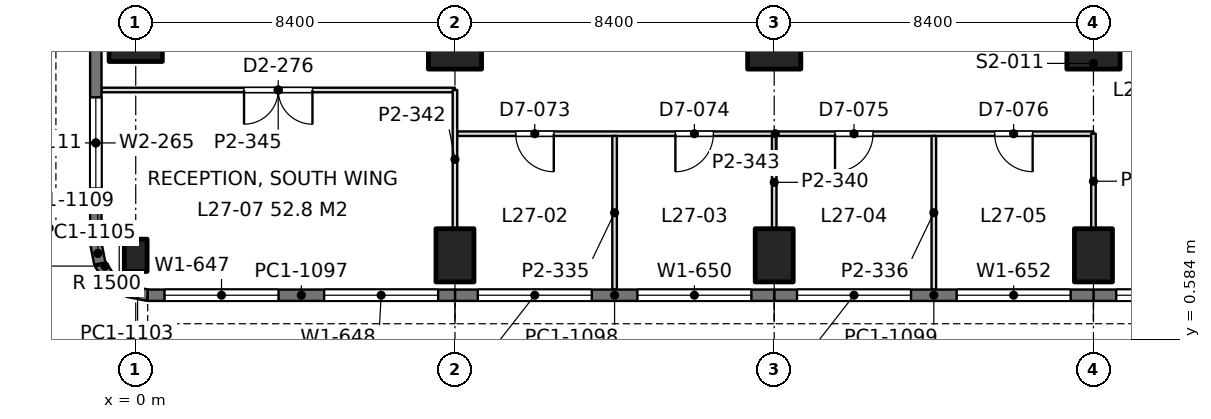
"""IFC4 building model, lengths in metres.
Left out: names, types, materials, properties, quantities, classifications, styles, units other than length and angle.
Written with IfcOpenShell. Run it as: python <this file> out.ifc"""

import sys

from ifc_helpers import new_model, si_unit, direction, frame, frame_2d, origin, origin_2d, place, context, subcontext, project, spatial, rectangle, extrude, element, fill, save


model = new_model("IFC4")
c1 = context("Model", 3, precision=1e-05, world=origin(), true_north=direction((0.0, 1.0)))
c2 = subcontext(c1, "Body", "Model", "MODEL_VIEW")
j1 = project(units=[si_unit("LENGTHUNIT", "METRE"), si_unit("PLANEANGLEUNIT", "RADIAN")], contexts=[c1])
p1 = place(None, origin())
s1 = spatial("IfcSite", under=j1, at=p1, CompositionType="ELEMENT")
p2 = place(p1, origin())
s2 = spatial("IfcBuilding", under=s1, at=p2, CompositionType="ELEMENT")
p3 = place(p2, frame((0.0, 0.0, 121.8)))
s3 = spatial("IfcBuildingStorey", under=s2, at=p3, CompositionType="ELEMENT", Elevation=121.8)
p4 = place(p3, frame((0.0, 2.8, 0.0), z_axis=(0.0, 0.0, 1.0), x_axis=(1.0, 0.0, 0.0)))
e1 = element("IfcColumn", 1, at=p4, inside=s3, PredefinedType="COLUMN", context=c2, shape_type="SweptSolid", body=[
    extrude(rectangle(XDim=0.6, YDim=0.85, at=origin_2d()), origin(), (0.0, 0.0, 1.0), 4.2),
])
for number, where, z_axis, x_axis in (
    (2, (0.0, 8.4, 0.0), (0.0, 0.0, 1.0), (0.0, 1.0, 0.0)),
    (3, (8.4, 2.8, 0.0), (0.0, 0.0, 1.0), (1.0, 0.0, 0.0)),
):
    element("IfcColumn", number, at=place(p3, frame(where, z_axis=z_axis, x_axis=x_axis)), inside=s3, PredefinedType="COLUMN", context=c2, shape_type="SweptSolid", body=[
        extrude(rectangle(XDim=1.0, YDim=1.4, at=origin_2d()), origin(), (0.0, 0.0, 1.0), 4.2),
    ])
p5 = place(p3, frame((8.4, 8.4, 0.0), z_axis=(0.0, 0.0, 1.0), x_axis=(1.0, 0.0, 0.0)))
e4 = element("IfcColumn", 4, at=p5, inside=s3, PredefinedType="COLUMN", context=c2, shape_type="SweptSolid", body=[
    extrude(rectangle(XDim=1.4, YDim=1.4, at=origin_2d()), origin(), (0.0, 0.0, 1.0), 4.2),
])
p6 = place(p3, frame((16.8, 2.8, 0.0), z_axis=(0.0, 0.0, 1.0), x_axis=(1.0, 0.0, 0.0)))
e5 = element("IfcColumn", 5, at=p6, inside=s3, PredefinedType="COLUMN", context=c2, shape_type="SweptSolid", body=[
    extrude(rectangle(XDim=1.0, YDim=1.4, at=origin_2d()), origin(), (0.0, 0.0, 1.0), 4.2),
])
p7 = place(p3, frame((16.8, 8.4, 0.0), z_axis=(0.0, 0.0, 1.0), x_axis=(1.0, 0.0, 0.0)))
e6 = element("IfcColumn", 6, at=p7, inside=s3, PredefinedType="COLUMN", context=c2, shape_type="SweptSolid", body=[
    extrude(rectangle(XDim=1.4, YDim=1.4, at=origin_2d()), origin(), (0.0, 0.0, 1.0), 4.2),
])
p8 = place(p3, frame((25.2, 2.8, 0.0), z_axis=(0.0, 0.0, 1.0), x_axis=(1.0, 0.0, 0.0)))
e7 = element("IfcColumn", 7, at=p8, inside=s3, PredefinedType="COLUMN", context=c2, shape_type="SweptSolid", body=[
    extrude(rectangle(XDim=1.0, YDim=1.4, at=origin_2d()), origin(), (0.0, 0.0, 1.0), 4.2),
])
p9 = place(p3, frame((25.2, 8.4, 0.0), z_axis=(0.0, 0.0, 1.0), x_axis=(1.0, 0.0, 0.0)))
e8 = element("IfcColumn", 8, at=p9, inside=s3, PredefinedType="COLUMN", context=c2, shape_type="SweptSolid", body=[
    extrude(rectangle(XDim=1.4, YDim=1.4, at=origin_2d()), origin(), (0.0, 0.0, 1.0), 4.2),
])
p10 = place(p3, frame((33.6, 1.75, 0.0), z_axis=(0.0, 0.0, 1.0), x_axis=(-1.0, 0.0, 0.0)))
e9 = element("IfcWall", 9, at=p10, inside=s3, PredefinedType="SOLIDWALL", context=c2, shape_type="SweptSolid", body=[
    extrude(rectangle(XDim=8.4, YDim=0.3, at=frame_2d((4.2, 0.0))), origin(), (0.0, 0.0, 1.0), 4.05),
])
p11 = place(p10, frame((0.6, 0.0, 0.9)))
e10 = element("IfcOpeningElement", 10, at=p11, cuts=e9, PredefinedType="OPENING", context=c2, shape_type="SweptSolid", body=[
    extrude(rectangle(XDim=3.0, YDim=1.9, at=frame_2d((1.5, 0.95))), frame((0.0, 0.16, 0.0), z_axis=(0.0, -1.0, 0.0), x_axis=(1.0, 0.0, 0.0)), (0.0, 0.0, 1.0), 0.32),
])
p12 = place(p10, frame((4.8, 0.0, 0.9)))
e11 = element("IfcOpeningElement", 11, at=p12, cuts=e9, PredefinedType="OPENING", context=c2, shape_type="SweptSolid", body=[
    extrude(rectangle(XDim=3.0, YDim=1.9, at=frame_2d((1.5, 0.95))), frame((0.0, 0.16, 0.0), z_axis=(0.0, -1.0, 0.0), x_axis=(1.0, 0.0, 0.0)), (0.0, 0.0, 1.0), 0.32),
])
p13 = place(p3, frame((25.2, 1.75, 0.0), z_axis=(0.0, 0.0, 1.0), x_axis=(-1.0, 0.0, 0.0)))
e12 = element("IfcWall", 12, at=p13, inside=s3, PredefinedType="SOLIDWALL", context=c2, shape_type="SweptSolid", body=[
    extrude(rectangle(XDim=8.4, YDim=0.3, at=frame_2d((4.2, 0.0))), origin(), (0.0, 0.0, 1.0), 4.05),
])
p14 = place(p13, frame((0.6, 0.0, 0.9)))
e13 = element("IfcOpeningElement", 13, at=p14, cuts=e12, PredefinedType="OPENING", context=c2, shape_type="SweptSolid", body=[
    extrude(rectangle(XDim=3.0, YDim=1.9, at=frame_2d((1.5, 0.95))), frame((0.0, 0.16, 0.0), z_axis=(0.0, -1.0, 0.0), x_axis=(1.0, 0.0, 0.0)), (0.0, 0.0, 1.0), 0.32),
])
p15 = place(p13, frame((4.8, 0.0, 0.9)))
e14 = element("IfcOpeningElement", 14, at=p15, cuts=e12, PredefinedType="OPENING", context=c2, shape_type="SweptSolid", body=[
    extrude(rectangle(XDim=3.0, YDim=1.9, at=frame_2d((1.5, 0.95))), frame((0.0, 0.16, 0.0), z_axis=(0.0, -1.0, 0.0), x_axis=(1.0, 0.0, 0.0)), (0.0, 0.0, 1.0), 0.32),
])
p16 = place(p3, frame((16.8, 1.75, 0.0), z_axis=(0.0, 0.0, 1.0), x_axis=(-1.0, 0.0, 0.0)))
e15 = element("IfcWall", 15, at=p16, inside=s3, PredefinedType="SOLIDWALL", context=c2, shape_type="SweptSolid", body=[
    extrude(rectangle(XDim=8.4, YDim=0.3, at=frame_2d((4.2, 0.0))), origin(), (0.0, 0.0, 1.0), 4.05),
])
p17 = place(p16, frame((0.6, 0.0, 0.9)))
e16 = element("IfcOpeningElement", 16, at=p17, cuts=e15, PredefinedType="OPENING", context=c2, shape_type="SweptSolid", body=[
    extrude(rectangle(XDim=3.0, YDim=1.9, at=frame_2d((1.5, 0.95))), frame((0.0, 0.16, 0.0), z_axis=(0.0, -1.0, 0.0), x_axis=(1.0, 0.0, 0.0)), (0.0, 0.0, 1.0), 0.32),
])
p18 = place(p16, frame((4.8, 0.0, 0.9)))
e17 = element("IfcOpeningElement", 17, at=p18, cuts=e15, PredefinedType="OPENING", context=c2, shape_type="SweptSolid", body=[
    extrude(rectangle(XDim=3.0, YDim=1.9, at=frame_2d((1.5, 0.95))), frame((0.0, 0.16, 0.0), z_axis=(0.0, -1.0, 0.0), x_axis=(1.0, 0.0, 0.0)), (0.0, 0.0, 1.0), 0.32),
])
p19 = place(p3, frame((8.4, 1.75, 0.0), z_axis=(0.0, 0.0, 1.0), x_axis=(-1.0, 0.0, 0.0)))
e18 = element("IfcWall", 18, at=p19, inside=s3, PredefinedType="SOLIDWALL", context=c2, shape_type="SweptSolid", body=[
    extrude(rectangle(XDim=8.085, YDim=0.3, at=frame_2d((4.042, 0.0))), origin(), (0.0, 0.0, 1.0), 4.05),
])
p20 = place(p19, frame((0.443, 0.0, 0.9)))
e19 = element("IfcOpeningElement", 19, at=p20, cuts=e18, PredefinedType="OPENING", context=c2, shape_type="SweptSolid", body=[
    extrude(rectangle(XDim=3.0, YDim=1.9, at=frame_2d((1.5, 0.95))), frame((0.0, 0.16, 0.0), z_axis=(0.0, -1.0, 0.0), x_axis=(1.0, 0.0, 0.0)), (0.0, 0.0, 1.0), 0.32),
])
p21 = place(p19, frame((4.643, 0.0, 0.9)))
e20 = element("IfcOpeningElement", 20, at=p21, cuts=e18, PredefinedType="OPENING", context=c2, shape_type="SweptSolid", body=[
    extrude(rectangle(XDim=3.0, YDim=1.9, at=frame_2d((1.5, 0.95))), frame((0.0, 0.16, 0.0), z_axis=(0.0, -1.0, 0.0), x_axis=(1.0, 0.0, 0.0)), (0.0, 0.0, 1.0), 0.32),
])
p22 = place(p3, frame((0.315, 1.75, 0.0), z_axis=(0.0, 0.0, 1.0), x_axis=(-0.980788534345, 0.195073962632, 0.0)))
e21 = element("IfcWall", 21, at=p22, inside=s3, PredefinedType="SOLIDWALL", context=c2, shape_type="SweptSolid", body=[
    extrude(rectangle(XDim=0.541, YDim=0.3, at=frame_2d((0.271, 0.0))), origin(), (0.0, 0.0, 1.0), 4.05),
])
for number, where, z_axis, x_axis in (
    (22, (-0.216, 1.855, 0.0), (0.0, 0.0, 1.0), (-0.831, 0.556, 0.0)),
    (23, (-0.653, 2.147, 0.0), (0.0, 0.0, 1.0), (-0.556, 0.831, 0.0)),
):
    element("IfcWall", number, at=place(p3, frame(where, z_axis=z_axis, x_axis=x_axis)), inside=s3, PredefinedType="SOLIDWALL", context=c2, shape_type="SweptSolid", body=[
        extrude(rectangle(XDim=0.526, YDim=0.3, at=frame_2d((0.263, 0.0))), origin(), (0.0, 0.0, 1.0), 4.05),
    ])
p23 = place(p3, frame((-0.945, 2.584, 0.0), z_axis=(0.0, 0.0, 1.0), x_axis=(-0.195073962632, 0.980788534345, 0.0)))
e24 = element("IfcWall", 24, at=p23, inside=s3, PredefinedType="SOLIDWALL", context=c2, shape_type="SweptSolid", body=[
    extrude(rectangle(XDim=0.541, YDim=0.3, at=frame_2d((0.271, 0.0))), origin(), (0.0, 0.0, 1.0), 4.05),
])
p24 = place(p3, frame((-1.05, 3.115, 0.0), z_axis=(0.0, 0.0, 1.0), x_axis=(0.0, 1.0, 0.0)))
e25 = element("IfcWall", 25, at=p24, inside=s3, PredefinedType="SOLIDWALL", context=c2, shape_type="SweptSolid", body=[
    extrude(rectangle(XDim=5.285, YDim=0.3, at=frame_2d((2.643, 0.0))), origin(), (0.0, 0.0, 1.0), 4.05),
])
p25 = place(p24, frame((1.443, 0.0, 0.9)))
e26 = element("IfcOpeningElement", 26, at=p25, cuts=e25, PredefinedType="OPENING", context=c2, shape_type="SweptSolid", body=[
    extrude(rectangle(XDim=2.4, YDim=1.9, at=frame_2d((1.2, 0.95))), frame((0.0, 0.16, 0.0), z_axis=(0.0, -1.0, 0.0), x_axis=(1.0, 0.0, 0.0)), (0.0, 0.0, 1.0), 0.32),
])
p26 = place(p3, frame((-0.902, 7.15, 0.0), z_axis=(0.0, 0.0, 1.0), x_axis=(1.0, 0.0, 0.0)))
e27 = element("IfcWall", 27, at=p26, inside=s3, PredefinedType="PARTITIONING", context=c2, shape_type="SweptSolid", body=[
    extrude(rectangle(XDim=9.302, YDim=0.12, at=frame_2d((4.651, 0.0))), origin(), (0.0, 0.0, 1.0), 3.55),
])
p27 = place(p26, frame((3.752, 0.0, 0.0)))
e28 = element("IfcOpeningElement", 28, at=p27, cuts=e27, PredefinedType="OPENING", context=c2, shape_type="SweptSolid", body=[
    extrude(rectangle(XDim=1.8, YDim=2.2, at=frame_2d((0.9, 1.1))), frame((0.0, 0.07, 0.0), z_axis=(0.0, -1.0, 0.0), x_axis=(1.0, 0.0, 0.0)), (0.0, 0.0, 1.0), 0.14),
])
p28 = place(p3, frame((8.458, 6.0, 0.0), z_axis=(0.0, 0.0, 1.0), x_axis=(1.0, 0.0, 0.0)))
e29 = element("IfcWall", 29, at=p28, inside=s3, PredefinedType="PARTITIONING", context=c2, shape_type="SweptSolid", body=[
    extrude(rectangle(XDim=16.742, YDim=0.12, at=frame_2d((8.371, 0.0))), origin(), (0.0, 0.0, 1.0), 3.55),
])
p29 = place(p28, frame((1.542, 0.0, 0.0)))
e30 = element("IfcOpeningElement", 30, at=p29, cuts=e29, PredefinedType="OPENING", context=c2, shape_type="SweptSolid", body=[
    extrude(rectangle(XDim=1.0, YDim=2.4, at=frame_2d((0.5, 1.2))), frame((0.0, 0.07, 0.0), z_axis=(0.0, -1.0, 0.0), x_axis=(1.0, 0.0, 0.0)), (0.0, 0.0, 1.0), 0.14),
])
p30 = place(p28, frame((5.742, 0.0, 0.0)))
e31 = element("IfcOpeningElement", 31, at=p30, cuts=e29, PredefinedType="OPENING", context=c2, shape_type="SweptSolid", body=[
    extrude(rectangle(XDim=1.0, YDim=2.4, at=frame_2d((0.5, 1.2))), frame((0.0, 0.07, 0.0), z_axis=(0.0, -1.0, 0.0), x_axis=(1.0, 0.0, 0.0)), (0.0, 0.0, 1.0), 0.14),
])
p31 = place(p28, frame((9.942, 0.0, 0.0)))
e32 = element("IfcOpeningElement", 32, at=p31, cuts=e29, PredefinedType="OPENING", context=c2, shape_type="SweptSolid", body=[
    extrude(rectangle(XDim=1.0, YDim=2.4, at=frame_2d((0.5, 1.2))), frame((0.0, 0.07, 0.0), z_axis=(0.0, -1.0, 0.0), x_axis=(1.0, 0.0, 0.0)), (0.0, 0.0, 1.0), 0.14),
])
p32 = place(p28, frame((14.142, 0.0, 0.0)))
e33 = element("IfcOpeningElement", 33, at=p32, cuts=e29, PredefinedType="OPENING", context=c2, shape_type="SweptSolid", body=[
    extrude(rectangle(XDim=1.0, YDim=2.4, at=frame_2d((0.5, 1.2))), frame((0.0, 0.07, 0.0), z_axis=(0.0, -1.0, 0.0), x_axis=(1.0, 0.0, 0.0)), (0.0, 0.0, 1.0), 0.14),
])
p33 = place(p3, frame((8.4, 3.499, 0.0), z_axis=(0.0, 0.0, 1.0), x_axis=(0.0, 1.0, 0.0)))
e34 = element("IfcWall", 34, at=p33, inside=s3, PredefinedType="PARTITIONING", context=c2, shape_type="SweptSolid", body=[
    extrude(rectangle(XDim=3.651, YDim=0.12, at=frame_2d((1.825, 0.0))), origin(), (0.0, 0.0, 1.0), 3.55),
])
p34 = place(p3, frame((12.6, 1.898, 0.0), z_axis=(0.0, 0.0, 1.0), x_axis=(0.0, 1.0, 0.0)))
e35 = element("IfcWall", 35, at=p34, inside=s3, PredefinedType="PARTITIONING", context=c2, shape_type="SweptSolid", body=[
    extrude(rectangle(XDim=4.044, YDim=0.12, at=frame_2d((2.022, 0.0))), origin(), (0.0, 0.0, 1.0), 3.56),
])
p35 = place(p3, frame((16.8, 3.499, 0.0), z_axis=(0.0, 0.0, 1.0), x_axis=(0.0, 1.0, 0.0)))
e36 = element("IfcWall", 36, at=p35, inside=s3, PredefinedType="PARTITIONING", context=c2, shape_type="SweptSolid", body=[
    extrude(rectangle(XDim=2.443, YDim=0.12, at=frame_2d((1.221, 0.0))), origin(), (0.0, 0.0, 1.0), 3.55),
])
p36 = place(p3, frame((21.0, 1.898, 0.0), z_axis=(0.0, 0.0, 1.0), x_axis=(0.0, 1.0, 0.0)))
e37 = element("IfcWall", 37, at=p36, inside=s3, PredefinedType="PARTITIONING", context=c2, shape_type="SweptSolid", body=[
    extrude(rectangle(XDim=4.044, YDim=0.12, at=frame_2d((2.022, 0.0))), origin(), (0.0, 0.0, 1.0), 3.56),
])
p37 = place(p3, frame((25.2, 3.499, 0.0), z_axis=(0.0, 0.0, 1.0), x_axis=(0.0, 1.0, 0.0)))
e38 = element("IfcWall", 38, at=p37, inside=s3, PredefinedType="PARTITIONING", context=c2, shape_type="SweptSolid", body=[
    extrude(rectangle(XDim=2.501, YDim=0.12, at=frame_2d((1.25, 0.0))), origin(), (0.0, 0.0, 1.0), 3.55),
])
p38 = place(p12, origin())
e39 = element("IfcWindow", 39, at=p38, inside=s3, PartitioningType="SINGLE_PANEL", PredefinedType="WINDOW", context=c2, shape_type="SweptSolid", body=[
    extrude(rectangle(XDim=3.0, YDim=1.9, at=frame_2d((1.5, 0.95))), frame((0.0, 0.03, 0.0), z_axis=(0.0, -1.0, 0.0), x_axis=(1.0, 0.0, 0.0)), (0.0, 0.0, 1.0), 0.06),
])
fill(e11, e39)
p39 = place(p14, origin())
e40 = element("IfcWindow", 40, at=p39, inside=s3, PartitioningType="SINGLE_PANEL", PredefinedType="WINDOW", context=c2, shape_type="SweptSolid", body=[
    extrude(rectangle(XDim=3.0, YDim=1.9, at=frame_2d((1.5, 0.95))), frame((0.0, 0.03, 0.0), z_axis=(0.0, -1.0, 0.0), x_axis=(1.0, 0.0, 0.0)), (0.0, 0.0, 1.0), 0.06),
])
fill(e13, e40)
p40 = place(p15, origin())
e41 = element("IfcWindow", 41, at=p40, inside=s3, PartitioningType="SINGLE_PANEL", PredefinedType="WINDOW", context=c2, shape_type="SweptSolid", body=[
    extrude(rectangle(XDim=3.0, YDim=1.9, at=frame_2d((1.5, 0.95))), frame((0.0, 0.03, 0.0), z_axis=(0.0, -1.0, 0.0), x_axis=(1.0, 0.0, 0.0)), (0.0, 0.0, 1.0), 0.06),
])
fill(e14, e41)
p41 = place(p17, origin())
e42 = element("IfcWindow", 42, at=p41, inside=s3, PartitioningType="SINGLE_PANEL", PredefinedType="WINDOW", context=c2, shape_type="SweptSolid", body=[
    extrude(rectangle(XDim=3.0, YDim=1.9, at=frame_2d((1.5, 0.95))), frame((0.0, 0.03, 0.0), z_axis=(0.0, -1.0, 0.0), x_axis=(1.0, 0.0, 0.0)), (0.0, 0.0, 1.0), 0.06),
])
fill(e16, e42)
p42 = place(p18, origin())
e43 = element("IfcWindow", 43, at=p42, inside=s3, PartitioningType="SINGLE_PANEL", PredefinedType="WINDOW", context=c2, shape_type="SweptSolid", body=[
    extrude(rectangle(XDim=3.0, YDim=1.9, at=frame_2d((1.5, 0.95))), frame((0.0, 0.03, 0.0), z_axis=(0.0, -1.0, 0.0), x_axis=(1.0, 0.0, 0.0)), (0.0, 0.0, 1.0), 0.06),
])
fill(e17, e43)
p43 = place(p20, origin())
e44 = element("IfcWindow", 44, at=p43, inside=s3, PartitioningType="SINGLE_PANEL", PredefinedType="WINDOW", context=c2, shape_type="SweptSolid", body=[
    extrude(rectangle(XDim=3.0, YDim=1.9, at=frame_2d((1.5, 0.95))), frame((0.0, 0.03, 0.0), z_axis=(0.0, -1.0, 0.0), x_axis=(1.0, 0.0, 0.0)), (0.0, 0.0, 1.0), 0.06),
])
fill(e19, e44)
p44 = place(p21, origin())
e45 = element("IfcWindow", 45, at=p44, inside=s3, PartitioningType="SINGLE_PANEL", PredefinedType="WINDOW", context=c2, shape_type="SweptSolid", body=[
    extrude(rectangle(XDim=3.0, YDim=1.9, at=frame_2d((1.5, 0.95))), frame((0.0, 0.03, 0.0), z_axis=(0.0, -1.0, 0.0), x_axis=(1.0, 0.0, 0.0)), (0.0, 0.0, 1.0), 0.06),
])
fill(e20, e45)
p45 = place(p25, origin())
e46 = element("IfcWindow", 46, at=p45, inside=s3, PartitioningType="SINGLE_PANEL", PredefinedType="WINDOW", context=c2, shape_type="SweptSolid", body=[
    extrude(rectangle(XDim=2.4, YDim=1.9, at=frame_2d((1.2, 0.95))), frame((0.0, 0.03, 0.0), z_axis=(0.0, -1.0, 0.0), x_axis=(1.0, 0.0, 0.0)), (0.0, 0.0, 1.0), 0.06),
])
fill(e26, e46)
p46 = place(p27, frame((1.8, 0.0, 0.0), z_axis=(0.0, 0.0, 1.0), x_axis=(-1.0, 0.0, 0.0)))
e47 = element("IfcDoor", 47, at=p46, inside=s3, OperationType="DOUBLE_DOOR_SINGLE_SWING", PredefinedType="DOOR", context=c2, shape_type="SweptSolid", body=[
    extrude(rectangle(XDim=1.8, YDim=2.2, at=frame_2d((0.9, 1.1))), frame((0.0, 0.025, 0.0), z_axis=(0.0, -1.0, 0.0), x_axis=(1.0, 0.0, 0.0)), (0.0, 0.0, 1.0), 0.05),
])
fill(e28, e47)
p47 = place(p29, frame((1.0, 0.0, 0.0), z_axis=(0.0, 0.0, 1.0), x_axis=(-1.0, 0.0, 0.0)))
e48 = element("IfcDoor", 48, at=p47, inside=s3, OperationType="SINGLE_SWING_LEFT", PredefinedType="DOOR", context=c2, shape_type="SweptSolid", body=[
    extrude(rectangle(XDim=1.0, YDim=2.4, at=frame_2d((0.5, 1.2))), frame((0.0, 0.025, 0.0), z_axis=(0.0, -1.0, 0.0), x_axis=(1.0, 0.0, 0.0)), (0.0, 0.0, 1.0), 0.05),
])
fill(e30, e48)
p48 = place(p30, frame((1.0, 0.0, 0.0), z_axis=(0.0, 0.0, 1.0), x_axis=(-1.0, 0.0, 0.0)))
e49 = element("IfcDoor", 49, at=p48, inside=s3, OperationType="SINGLE_SWING_RIGHT", PredefinedType="DOOR", context=c2, shape_type="SweptSolid", body=[
    extrude(rectangle(XDim=1.0, YDim=2.4, at=frame_2d((0.5, 1.2))), frame((0.0, 0.025, 0.0), z_axis=(0.0, -1.0, 0.0), x_axis=(1.0, 0.0, 0.0)), (0.0, 0.0, 1.0), 0.05),
])
fill(e31, e49)
p49 = place(p31, frame((1.0, 0.0, 0.0), z_axis=(0.0, 0.0, 1.0), x_axis=(-1.0, 0.0, 0.0)))
e50 = element("IfcDoor", 50, at=p49, inside=s3, OperationType="SINGLE_SWING_RIGHT", PredefinedType="DOOR", context=c2, shape_type="SweptSolid", body=[
    extrude(rectangle(XDim=1.0, YDim=2.4, at=frame_2d((0.5, 1.2))), frame((0.0, 0.025, 0.0), z_axis=(0.0, -1.0, 0.0), x_axis=(1.0, 0.0, 0.0)), (0.0, 0.0, 1.0), 0.05),
])
fill(e32, e50)
p50 = place(p32, frame((1.0, 0.0, 0.0), z_axis=(0.0, 0.0, 1.0), x_axis=(-1.0, 0.0, 0.0)))
e51 = element("IfcDoor", 51, at=p50, inside=s3, OperationType="SINGLE_SWING_LEFT", PredefinedType="DOOR", context=c2, shape_type="SweptSolid", body=[
    extrude(rectangle(XDim=1.0, YDim=2.4, at=frame_2d((0.5, 1.2))), frame((0.0, 0.025, 0.0), z_axis=(0.0, -1.0, 0.0), x_axis=(1.0, 0.0, 0.0)), (0.0, 0.0, 1.0), 0.05),
])
fill(e33, e51)
save(model, sys.argv[1])
